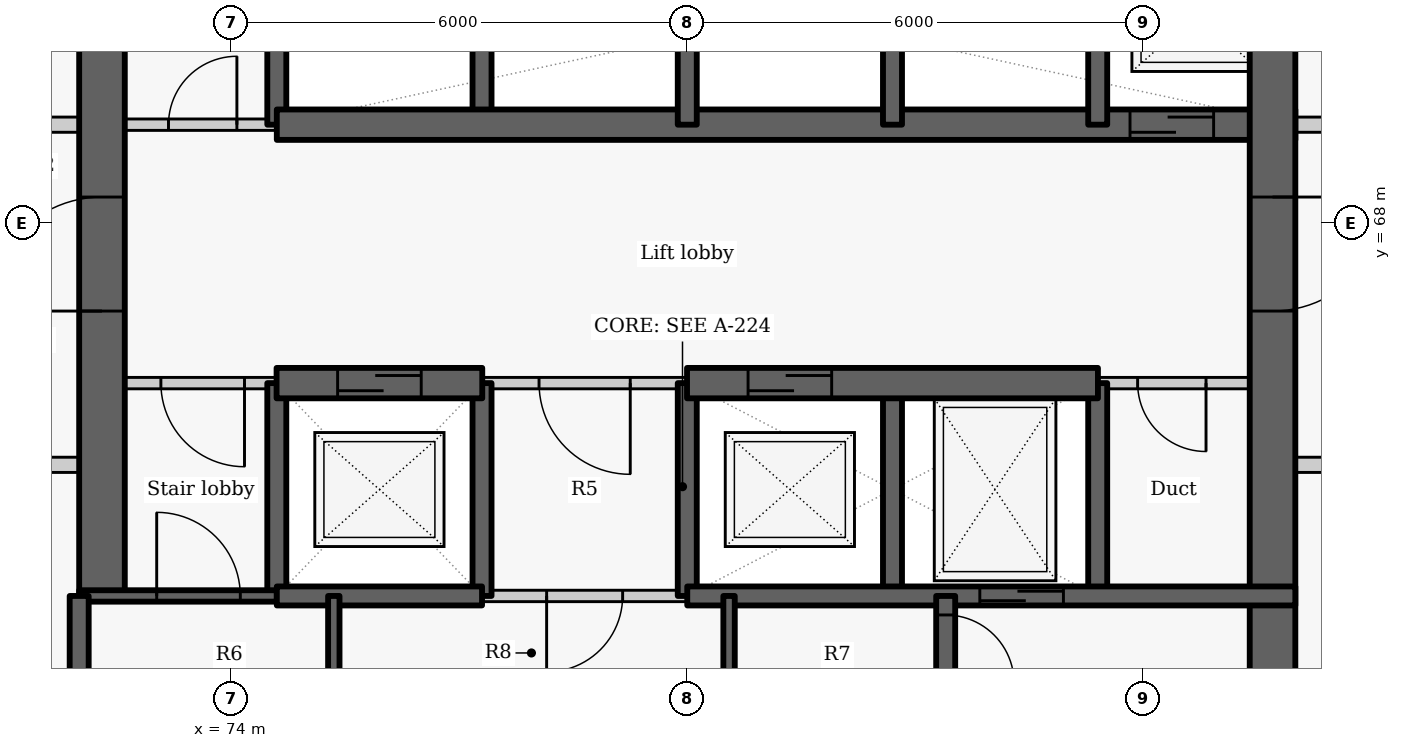
"""IFC4 building model, lengths in metres.
Left out: names, types, materials, properties, quantities, classifications, styles, units other than length and angle.
Written with IfcOpenShell. Run it as: python <this file> out.ifc"""

import sys

from ifc_helpers import new_model, si_unit, direction, frame, frame_2d, origin, place, context, subcontext, project, spatial, rectangle, extrude, element, fill, save


model = new_model("IFC4")
c1 = context("Model", 3, precision=1e-05, world=origin(), true_north=direction((0.0, 1.0)))
c2 = subcontext(c1, "Body", "Model", "MODEL_VIEW")
j1 = project(units=[si_unit("LENGTHUNIT", "METRE"), si_unit("PLANEANGLEUNIT", "RADIAN")], contexts=[c1])
p1 = place(None, origin())
s1 = spatial("IfcSite", under=j1, at=p1, CompositionType="ELEMENT")
p2 = place(p1, origin())
s2 = spatial("IfcBuilding", under=s1, at=p2, CompositionType="ELEMENT")
p3 = place(p2, frame((0.0, 0.0, 127.2)))
s3 = spatial("IfcBuildingStorey", under=s2, at=p3, CompositionType="ELEMENT", Elevation=127.2)
p4 = place(p3, frame((74.6, 63.1, -0.41), z_axis=(0.0, 0.0, 1.0), x_axis=(0.0, 1.0, 0.0)))
e1 = element("IfcWall", 1, at=p4, inside=s3, PredefinedType="SHEAR", context=c2, shape_type="SweptSolid", body=[
    extrude(rectangle(XDim=2.8, YDim=0.25, at=frame_2d((1.4, 0.0))), origin(), (0.0, 0.0, 1.0), 3.435),
])
p5 = place(p3, frame((74.6, 69.3, -0.41), z_axis=(0.0, 0.0, 1.0), x_axis=(0.0, 1.0, 0.0)))
e2 = element("IfcWall", 2, at=p5, inside=s3, PredefinedType="SHEAR", context=c2, shape_type="SweptSolid", body=[
    extrude(rectangle(XDim=2.9, YDim=0.25, at=frame_2d((1.45, 0.0))), origin(), (0.0, 0.0, 1.0), 3.435),
])
p6 = place(p3, frame((72.0, 69.3, 0.0), z_axis=(0.0, 0.0, 1.0), x_axis=(1.0, 0.0, 0.0)))
e3 = element("IfcWall", 3, at=p6, inside=s3, PredefinedType="PARTITIONING", context=c2, shape_type="SweptSolid", body=[
    extrude(rectangle(XDim=2.6, YDim=0.15, at=frame_2d((1.3, 0.0))), origin(), (0.0, 0.0, 1.0), 3.025),
])
p7 = place(p6, frame((1.175, 0.0, 0.0)))
e4 = element("IfcOpeningElement", 4, at=p7, cuts=e3, PredefinedType="OPENING", context=c2, shape_type="SweptSolid", body=[
    extrude(rectangle(XDim=0.9, YDim=2.1, at=frame_2d((0.45, 1.05))), frame((0.0, 0.085, 0.0), z_axis=(0.0, -1.0, 0.0), x_axis=(1.0, 0.0, 0.0)), (0.0, 0.0, 1.0), 0.17),
])
p8 = place(p3, frame((72.3, 63.1, -0.41), z_axis=(0.0, 0.0, 1.0), x_axis=(0.0, 1.0, 0.0)))
e5 = element("IfcWall", 5, at=p8, inside=s3, PredefinedType="SHEAR", context=c2, shape_type="SweptSolid", body=[
    extrude(rectangle(XDim=9.1, YDim=0.6, at=frame_2d((4.55, 0.0))), origin(), (0.0, 0.0, 1.0), 3.435),
])
p9 = place(p8, frame((3.748, 0.0, 0.41)))
e6 = element("IfcOpeningElement", 6, at=p9, cuts=e5, PredefinedType="OPENING", context=c2, shape_type="SweptSolid", body=[
    extrude(rectangle(XDim=1.5, YDim=2.1, at=frame_2d((0.75, 1.05))), frame((0.0, 0.31, 0.0), z_axis=(0.0, -1.0, 0.0), x_axis=(1.0, 0.0, 0.0)), (0.0, 0.0, 1.0), 0.62),
])
p10 = place(p3, frame((77.3, 63.1, -0.41), z_axis=(0.0, 0.0, 1.0), x_axis=(0.0, 1.0, 0.0)))
e7 = element("IfcWall", 7, at=p10, inside=s3, PredefinedType="SHEAR", context=c2, shape_type="SweptSolid", body=[
    extrude(rectangle(XDim=2.8, YDim=0.25, at=frame_2d((1.4, 0.0))), origin(), (0.0, 0.0, 1.0), 3.435),
])
p11 = place(p3, frame((77.3, 69.3, -0.41), z_axis=(0.0, 0.0, 1.0), x_axis=(0.0, 1.0, 0.0)))
e8 = element("IfcWall", 8, at=p11, inside=s3, PredefinedType="SHEAR", context=c2, shape_type="SweptSolid", body=[
    extrude(rectangle(XDim=2.9, YDim=0.25, at=frame_2d((1.45, 0.0))), origin(), (0.0, 0.0, 1.0), 3.435),
])
p12 = place(p3, frame((74.6, 69.3, -0.41), z_axis=(0.0, 0.0, 1.0), x_axis=(1.0, 0.0, 0.0)))
e9 = element("IfcWall", 9, at=p12, inside=s3, PredefinedType="SHEAR", context=c2, shape_type="SweptSolid", body=[
    extrude(rectangle(XDim=13.4, YDim=0.4, at=frame_2d((6.7, 0.0))), origin(), (0.0, 0.0, 1.0), 3.435),
])
p13 = place(p12, frame((11.225, 0.0, 0.41)))
e10 = element("IfcOpeningElement", 10, at=p13, cuts=e9, PredefinedType="OPENING", context=c2, shape_type="SweptSolid", body=[
    extrude(rectangle(XDim=1.1, YDim=2.1, at=frame_2d((0.55, 1.05))), frame((0.0, 0.21, 0.0), z_axis=(0.0, -1.0, 0.0), x_axis=(1.0, 0.0, 0.0)), (0.0, 0.0, 1.0), 0.42),
])
p14 = place(p3, frame((80.0, 63.1, -0.41), z_axis=(0.0, 0.0, 1.0), x_axis=(0.0, 1.0, 0.0)))
e11 = element("IfcWall", 11, at=p14, inside=s3, PredefinedType="SHEAR", context=c2, shape_type="SweptSolid", body=[
    extrude(rectangle(XDim=2.8, YDim=0.25, at=frame_2d((1.4, 0.0))), origin(), (0.0, 0.0, 1.0), 3.435),
])
p15 = place(p3, frame((80.0, 69.3, -0.41), z_axis=(0.0, 0.0, 1.0), x_axis=(0.0, 1.0, 0.0)))
e12 = element("IfcWall", 12, at=p15, inside=s3, PredefinedType="SHEAR", context=c2, shape_type="SweptSolid", body=[
    extrude(rectangle(XDim=2.9, YDim=0.25, at=frame_2d((1.45, 0.0))), origin(), (0.0, 0.0, 1.0), 3.435),
])
p16 = place(p3, frame((82.7, 63.1, -0.41), z_axis=(0.0, 0.0, 1.0), x_axis=(0.0, 1.0, 0.0)))
e13 = element("IfcWall", 13, at=p16, inside=s3, PredefinedType="SHEAR", context=c2, shape_type="SweptSolid", body=[
    extrude(rectangle(XDim=2.8, YDim=0.25, at=frame_2d((1.4, 0.0))), origin(), (0.0, 0.0, 1.0), 3.435),
])
p17 = place(p3, frame((82.7, 69.3, -0.41), z_axis=(0.0, 0.0, 1.0), x_axis=(0.0, 1.0, 0.0)))
e14 = element("IfcWall", 14, at=p17, inside=s3, PredefinedType="SHEAR", context=c2, shape_type="SweptSolid", body=[
    extrude(rectangle(XDim=2.9, YDim=0.25, at=frame_2d((1.45, 0.0))), origin(), (0.0, 0.0, 1.0), 3.435),
])
p18 = place(p3, frame((85.4, 63.1, -0.41), z_axis=(0.0, 0.0, 1.0), x_axis=(0.0, 1.0, 0.0)))
e15 = element("IfcWall", 15, at=p18, inside=s3, PredefinedType="SHEAR", context=c2, shape_type="SweptSolid", body=[
    extrude(rectangle(XDim=2.8, YDim=0.25, at=frame_2d((1.4, 0.0))), origin(), (0.0, 0.0, 1.0), 3.435),
])
p19 = place(p3, frame((85.4, 69.3, -0.41), z_axis=(0.0, 0.0, 1.0), x_axis=(0.0, 1.0, 0.0)))
e16 = element("IfcWall", 16, at=p19, inside=s3, PredefinedType="SHEAR", context=c2, shape_type="SweptSolid", body=[
    extrude(rectangle(XDim=2.9, YDim=0.25, at=frame_2d((1.45, 0.0))), origin(), (0.0, 0.0, 1.0), 3.435),
])
p20 = place(p3, frame((87.7, 72.2, -0.41), z_axis=(0.0, 0.0, 1.0), x_axis=(0.0, -1.0, 0.0)))
e17 = element("IfcWall", 17, at=p20, inside=s3, PredefinedType="SHEAR", context=c2, shape_type="SweptSolid", body=[
    extrude(rectangle(XDim=15.6, YDim=0.6, at=frame_2d((7.8, 0.0))), origin(), (0.0, 0.0, 1.0), 3.435),
])
p21 = place(p20, frame((3.852, 0.0, 0.41)))
e18 = element("IfcOpeningElement", 18, at=p21, cuts=e17, PredefinedType="OPENING", context=c2, shape_type="SweptSolid", body=[
    extrude(rectangle(XDim=1.5, YDim=2.1, at=frame_2d((0.75, 1.05))), frame((0.0, 0.31, 0.0), z_axis=(0.0, -1.0, 0.0), x_axis=(1.0, 0.0, 0.0)), (0.0, 0.0, 1.0), 0.62),
])
p22 = place(p3, frame((74.603, 65.9, 0.0), z_axis=(0.0, 0.0, 1.0), x_axis=(-1.0, 0.0, 0.0)))
e19 = element("IfcWall", 19, at=p22, inside=s3, PredefinedType="PARTITIONING", context=c2, shape_type="SweptSolid", body=[
    extrude(rectangle(XDim=2.603, YDim=0.15, at=frame_2d((1.302, 0.0))), origin(), (0.0, 0.0, 1.0), 3.025),
])
p23 = place(p22, frame((0.428, 0.0, 0.0)))
e20 = element("IfcOpeningElement", 20, at=p23, cuts=e19, PredefinedType="OPENING", context=c2, shape_type="SweptSolid", body=[
    extrude(rectangle(XDim=1.1, YDim=2.1, at=frame_2d((0.55, 1.05))), frame((0.0, 0.085, 0.0), z_axis=(0.0, -1.0, 0.0), x_axis=(1.0, 0.0, 0.0)), (0.0, 0.0, 1.0), 0.17),
])
p24 = place(p3, frame((80.003, 65.9, 0.0), z_axis=(0.0, 0.0, 1.0), x_axis=(-1.0, 0.0, 0.0)))
e21 = element("IfcWall", 21, at=p24, inside=s3, PredefinedType="PARTITIONING", context=c2, shape_type="SweptSolid", body=[
    extrude(rectangle(XDim=2.706, YDim=0.15, at=frame_2d((1.353, 0.0))), origin(), (0.0, 0.0, 1.0), 3.025),
])
p25 = place(p24, frame((0.753, 0.0, 0.0)))
e22 = element("IfcOpeningElement", 22, at=p25, cuts=e21, PredefinedType="OPENING", context=c2, shape_type="SweptSolid", body=[
    extrude(rectangle(XDim=1.2, YDim=2.1, at=frame_2d((0.6, 1.05))), frame((0.0, 0.085, 0.0), z_axis=(0.0, -1.0, 0.0), x_axis=(1.0, 0.0, 0.0)), (0.0, 0.0, 1.0), 0.17),
])
p26 = place(p3, frame((88.0, 65.9, 0.0), z_axis=(0.0, 0.0, 1.0), x_axis=(-1.0, 0.0, 0.0)))
e23 = element("IfcWall", 23, at=p26, inside=s3, PredefinedType="PARTITIONING", context=c2, shape_type="SweptSolid", body=[
    extrude(rectangle(XDim=2.603, YDim=0.15, at=frame_2d((1.302, 0.0))), origin(), (0.0, 0.0, 1.0), 3.025),
])
p27 = place(p26, frame((1.175, 0.0, 0.0)))
e24 = element("IfcOpeningElement", 24, at=p27, cuts=e23, PredefinedType="OPENING", context=c2, shape_type="SweptSolid", body=[
    extrude(rectangle(XDim=0.9, YDim=2.1, at=frame_2d((0.45, 1.05))), frame((0.0, 0.085, 0.0), z_axis=(0.0, -1.0, 0.0), x_axis=(1.0, 0.0, 0.0)), (0.0, 0.0, 1.0), 0.17),
])
p28 = place(p3, frame((74.597, 65.9, -0.41), z_axis=(0.0, 0.0, 1.0), x_axis=(1.0, 0.0, 0.0)))
e25 = element("IfcWall", 25, at=p28, inside=s3, PredefinedType="SHEAR", context=c2, shape_type="SweptSolid", body=[
    extrude(rectangle(XDim=2.706, YDim=0.4, at=frame_2d((1.353, 0.0))), origin(), (0.0, 0.0, 1.0), 3.435),
])
p29 = place(p28, frame((0.803, 0.0, 0.41)))
e26 = element("IfcOpeningElement", 26, at=p29, cuts=e25, PredefinedType="OPENING", context=c2, shape_type="SweptSolid", body=[
    extrude(rectangle(XDim=1.1, YDim=2.1, at=frame_2d((0.55, 1.05))), frame((0.0, 0.21, 0.0), z_axis=(0.0, -1.0, 0.0), x_axis=(1.0, 0.0, 0.0)), (0.0, 0.0, 1.0), 0.42),
])
p30 = place(p3, frame((79.997, 65.9, -0.41), z_axis=(0.0, 0.0, 1.0), x_axis=(1.0, 0.0, 0.0)))
e27 = element("IfcWall", 27, at=p30, inside=s3, PredefinedType="SHEAR", context=c2, shape_type="SweptSolid", body=[
    extrude(rectangle(XDim=5.406, YDim=0.4, at=frame_2d((2.703, 0.0))), origin(), (0.0, 0.0, 1.0), 3.435),
])
p31 = place(p30, frame((0.803, 0.0, 0.41)))
e28 = element("IfcOpeningElement", 28, at=p31, cuts=e27, PredefinedType="OPENING", context=c2, shape_type="SweptSolid", body=[
    extrude(rectangle(XDim=1.1, YDim=2.1, at=frame_2d((0.55, 1.05))), frame((0.0, 0.21, 0.0), z_axis=(0.0, -1.0, 0.0), x_axis=(1.0, 0.0, 0.0)), (0.0, 0.0, 1.0), 0.42),
])
p32 = place(p3, frame((72.0, 63.1, -0.41), z_axis=(0.0, 0.0, 1.0), x_axis=(1.0, 0.0, 0.0)))
e29 = element("IfcWall", 29, at=p32, inside=s3, PredefinedType="SHEAR", context=c2, shape_type="SweptSolid", body=[
    extrude(rectangle(XDim=2.6, YDim=0.15, at=frame_2d((1.3, 0.0))), origin(), (0.0, 0.0, 1.0), 3.435),
])
p33 = place(p32, frame((1.02, 0.0, 0.41)))
e30 = element("IfcOpeningElement", 30, at=p33, cuts=e29, PredefinedType="OPENING", context=c2, shape_type="SweptSolid", body=[
    extrude(rectangle(XDim=1.1, YDim=2.1, at=frame_2d((0.55, 1.05))), frame((0.0, 0.085, 0.0), z_axis=(0.0, -1.0, 0.0), x_axis=(1.0, 0.0, 0.0)), (0.0, 0.0, 1.0), 0.17),
])
p34 = place(p3, frame((74.6, 63.1, -0.41), z_axis=(0.0, 0.0, 1.0), x_axis=(1.0, 0.0, 0.0)))
e31 = element("IfcWall", 31, at=p34, inside=s3, PredefinedType="SHEAR", context=c2, shape_type="SweptSolid", body=[
    extrude(rectangle(XDim=2.7, YDim=0.25, at=frame_2d((1.35, 0.0))), origin(), (0.0, 0.0, 1.0), 3.435),
])
p35 = place(p3, frame((80.0, 63.1, -0.41), z_axis=(0.0, 0.0, 1.0), x_axis=(1.0, 0.0, 0.0)))
e32 = element("IfcWall", 32, at=p35, inside=s3, PredefinedType="SHEAR", context=c2, shape_type="SweptSolid", body=[
    extrude(rectangle(XDim=8.0, YDim=0.25, at=frame_2d((4.0, 0.0))), origin(), (0.0, 0.0, 1.0), 3.435),
])
p36 = place(p35, frame((3.849, 0.0, 0.41)))
e33 = element("IfcOpeningElement", 33, at=p36, cuts=e32, PredefinedType="OPENING", context=c2, shape_type="SweptSolid", body=[
    extrude(rectangle(XDim=1.1, YDim=2.1, at=frame_2d((0.55, 1.05))), frame((0.0, 0.135, 0.0), z_axis=(0.0, -1.0, 0.0), x_axis=(1.0, 0.0, 0.0)), (0.0, 0.0, 1.0), 0.27),
])
p37 = place(p3, frame((80.0, 63.1, 0.0), z_axis=(0.0, 0.0, 1.0), x_axis=(-1.0, 0.0, 0.0)))
e34 = element("IfcWall", 34, at=p37, inside=s3, PredefinedType="PARTITIONING", context=c2, shape_type="SweptSolid", body=[
    extrude(rectangle(XDim=2.7, YDim=0.15, at=frame_2d((1.35, 0.0))), origin(), (0.0, 0.0, 1.0), 3.025),
])
p38 = place(p37, frame((0.85, 0.0, 0.0)))
e35 = element("IfcOpeningElement", 35, at=p38, cuts=e34, PredefinedType="OPENING", context=c2, shape_type="SweptSolid", body=[
    extrude(rectangle(XDim=1.0, YDim=2.1, at=frame_2d((0.5, 1.05))), frame((0.0, 0.085, 0.0), z_axis=(0.0, -1.0, 0.0), x_axis=(1.0, 0.0, 0.0)), (0.0, 0.0, 1.0), 0.17),
])
p39 = place(p3, frame((75.35, 61.597, -0.41), z_axis=(0.0, 0.0, 1.0), x_axis=(0.0, 1.0, 0.0)))
e36 = element("IfcWall", 36, at=p39, inside=s3, PredefinedType="SHEAR", context=c2, shape_type="SweptSolid", body=[
    extrude(rectangle(XDim=1.503, YDim=0.15, at=frame_2d((0.751, 0.0))), origin(), (0.0, 0.0, 1.0), 3.435),
])
p40 = place(p3, frame((72.0, 56.6, -0.41), z_axis=(0.0, 0.0, 1.0), x_axis=(0.0, 1.0, 0.0)))
e37 = element("IfcWall", 37, at=p40, inside=s3, PredefinedType="SHEAR", context=c2, shape_type="SweptSolid", body=[
    extrude(rectangle(XDim=6.5, YDim=0.25, at=frame_2d((3.25, 0.0))), origin(), (0.0, 0.0, 1.0), 3.435),
])
p41 = place(p3, frame((83.4, 63.1, -0.41), z_axis=(0.0, 0.0, 1.0), x_axis=(0.0, -1.0, 0.0)))
e38 = element("IfcWall", 38, at=p41, inside=s3, PredefinedType="SHEAR", context=c2, shape_type="SweptSolid", body=[
    extrude(rectangle(XDim=6.5, YDim=0.25, at=frame_2d((3.25, 0.0))), origin(), (0.0, 0.0, 1.0), 3.435),
])
p42 = place(p41, frame((0.25, 0.0, 0.41)))
e39 = element("IfcOpeningElement", 39, at=p42, cuts=e38, PredefinedType="OPENING", context=c2, shape_type="SweptSolid", body=[
    extrude(rectangle(XDim=0.9, YDim=2.1, at=frame_2d((0.45, 1.05))), frame((0.0, 0.135, 0.0), z_axis=(0.0, -1.0, 0.0), x_axis=(1.0, 0.0, 0.0)), (0.0, 0.0, 1.0), 0.27),
])
p43 = place(p3, frame((80.55, 61.597, -0.41), z_axis=(0.0, 0.0, 1.0), x_axis=(0.0, 1.0, 0.0)))
e40 = element("IfcWall", 40, at=p43, inside=s3, PredefinedType="SHEAR", context=c2, shape_type="SweptSolid", body=[
    extrude(rectangle(XDim=1.503, YDim=0.15, at=frame_2d((0.751, 0.0))), origin(), (0.0, 0.0, 1.0), 3.435),
])
p44 = place(p3, frame((70.577, 64.825, 0.0), z_axis=(0.0, 0.0, 1.0), x_axis=(1.0, 0.0, 0.0)))
e41 = element("IfcWall", 41, at=p44, inside=s3, PredefinedType="PARTITIONING", context=c2, shape_type="SweptSolid", body=[
    extrude(rectangle(XDim=1.423, YDim=0.2, at=frame_2d((0.711, 0.0))), origin(), (0.0, 0.0, 1.0), 3.025),
])
p45 = place(p3, frame((88.0, 64.825, 0.0), z_axis=(0.0, 0.0, 1.0), x_axis=(1.0, 0.0, 0.0)))
e42 = element("IfcWall", 42, at=p45, inside=s3, PredefinedType="PARTITIONING", context=c2, shape_type="SweptSolid", body=[
    extrude(rectangle(XDim=2.463, YDim=0.2, at=frame_2d((1.231, 0.0))), origin(), (0.0, 0.0, 1.0), 2.505),
])
for number, where, z_axis, x_axis in (
    (43, (70.45, 69.3, 0.0), (0.0, 0.0, 1.0), (1.0, 0.0, 0.0)),
    (44, (88.0, 69.3, 0.0), (0.0, 0.0, 1.0), (1.0, 0.0, 0.0)),
):
    element("IfcWall", number, at=place(p3, frame(where, z_axis=z_axis, x_axis=x_axis)), inside=s3, PredefinedType="PARTITIONING", context=c2, shape_type="SweptSolid", body=[
        extrude(rectangle(XDim=1.55, YDim=0.2, at=frame_2d((0.775, 0.0))), origin(), (0.0, 0.0, 1.0), 3.025),
    ])
p46 = place(p7, origin())
e45 = element("IfcDoor", 45, at=p46, inside=s3, OperationType="SINGLE_SWING_RIGHT", PredefinedType="DOOR", context=c2, shape_type="SweptSolid", body=[
    extrude(rectangle(XDim=0.9, YDim=2.1, at=frame_2d((0.45, 1.05))), frame((0.0, 0.025, 0.0), z_axis=(0.0, -1.0, 0.0), x_axis=(1.0, 0.0, 0.0)), (0.0, 0.0, 1.0), 0.05),
])
fill(e4, e45)
p47 = place(p13, origin())
e46 = element("IfcDoor", 46, at=p47, inside=s3, OperationType="SLIDING_TO_LEFT", PredefinedType="DOOR", context=c2, shape_type="SweptSolid", body=[
    extrude(rectangle(XDim=1.1, YDim=2.1, at=frame_2d((0.55, 1.05))), frame((0.0, 0.025, 0.0), z_axis=(0.0, -1.0, 0.0), x_axis=(1.0, 0.0, 0.0)), (0.0, 0.0, 1.0), 0.05),
])
fill(e10, e46)
p48 = place(p23, origin())
e47 = element("IfcDoor", 47, at=p48, inside=s3, OperationType="SINGLE_SWING_LEFT", PredefinedType="DOOR", context=c2, shape_type="SweptSolid", body=[
    extrude(rectangle(XDim=1.1, YDim=2.1, at=frame_2d((0.55, 1.05))), frame((0.0, 0.025, 0.0), z_axis=(0.0, -1.0, 0.0), x_axis=(1.0, 0.0, 0.0)), (0.0, 0.0, 1.0), 0.05),
])
fill(e20, e47)
p49 = place(p29, origin())
e48 = element("IfcDoor", 48, at=p49, inside=s3, OperationType="SLIDING_TO_LEFT", PredefinedType="DOOR", context=c2, shape_type="SweptSolid", body=[
    extrude(rectangle(XDim=1.1, YDim=2.1, at=frame_2d((0.55, 1.05))), frame((0.0, 0.025, 0.0), z_axis=(0.0, -1.0, 0.0), x_axis=(1.0, 0.0, 0.0)), (0.0, 0.0, 1.0), 0.05),
])
fill(e26, e48)
p50 = place(p25, origin())
e49 = element("IfcDoor", 49, at=p50, inside=s3, OperationType="DOUBLE_DOOR_SINGLE_SWING", PredefinedType="DOOR", context=c2, shape_type="SweptSolid", body=[
    extrude(rectangle(XDim=1.2, YDim=2.1, at=frame_2d((0.6, 1.05))), frame((0.0, 0.025, 0.0), z_axis=(0.0, -1.0, 0.0), x_axis=(1.0, 0.0, 0.0)), (0.0, 0.0, 1.0), 0.05),
])
fill(e22, e49)
p51 = place(p31, origin())
e50 = element("IfcDoor", 50, at=p51, inside=s3, OperationType="SLIDING_TO_LEFT", PredefinedType="DOOR", context=c2, shape_type="SweptSolid", body=[
    extrude(rectangle(XDim=1.1, YDim=2.1, at=frame_2d((0.55, 1.05))), frame((0.0, 0.025, 0.0), z_axis=(0.0, -1.0, 0.0), x_axis=(1.0, 0.0, 0.0)), (0.0, 0.0, 1.0), 0.05),
])
fill(e28, e50)
p52 = place(p36, origin())
e51 = element("IfcDoor", 51, at=p52, inside=s3, OperationType="SLIDING_TO_LEFT", PredefinedType="DOOR", context=c2, shape_type="SweptSolid", body=[
    extrude(rectangle(XDim=1.1, YDim=2.1, at=frame_2d((0.55, 1.05))), frame((0.0, 0.025, 0.0), z_axis=(0.0, -1.0, 0.0), x_axis=(1.0, 0.0, 0.0)), (0.0, 0.0, 1.0), 0.05),
])
fill(e33, e51)
p53 = place(p27, origin())
e52 = element("IfcDoor", 52, at=p53, inside=s3, OperationType="SINGLE_SWING_LEFT", PredefinedType="DOOR", context=c2, shape_type="SweptSolid", body=[
    extrude(rectangle(XDim=0.9, YDim=2.1, at=frame_2d((0.45, 1.05))), frame((0.0, 0.025, 0.0), z_axis=(0.0, -1.0, 0.0), x_axis=(1.0, 0.0, 0.0)), (0.0, 0.0, 1.0), 0.05),
])
fill(e24, e52)
p54 = place(p38, origin())
e53 = element("IfcDoor", 53, at=p54, inside=s3, OperationType="SINGLE_SWING_RIGHT", PredefinedType="DOOR", context=c2, shape_type="SweptSolid", body=[
    extrude(rectangle(XDim=1.0, YDim=2.1, at=frame_2d((0.5, 1.05))), frame((0.0, 0.025, 0.0), z_axis=(0.0, -1.0, 0.0), x_axis=(1.0, 0.0, 0.0)), (0.0, 0.0, 1.0), 0.05),
])
fill(e35, e53)
p55 = place(p33, origin())
e54 = element("IfcDoor", 54, at=p55, inside=s3, OperationType="SINGLE_SWING_LEFT", PredefinedType="DOOR", context=c2, shape_type="SweptSolid", body=[
    extrude(rectangle(XDim=1.1, YDim=2.1, at=frame_2d((0.55, 1.05))), frame((0.0, 0.025, 0.0), z_axis=(0.0, -1.0, 0.0), x_axis=(1.0, 0.0, 0.0)), (0.0, 0.0, 1.0), 0.05),
])
fill(e30, e54)
p56 = place(p42, origin())
e55 = element("IfcDoor", 55, at=p56, inside=s3, OperationType="SINGLE_SWING_RIGHT", PredefinedType="DOOR", context=c2, shape_type="SweptSolid", body=[
    extrude(rectangle(XDim=0.9, YDim=2.1, at=frame_2d((0.45, 1.05))), frame((0.0, 0.025, 0.0), z_axis=(0.0, -1.0, 0.0), x_axis=(1.0, 0.0, 0.0)), (0.0, 0.0, 1.0), 0.05),
])
fill(e39, e55)
p57 = place(p21, origin())
e56 = element("IfcDoor", 56, at=p57, inside=s3, OperationType="DOUBLE_DOOR_SINGLE_SWING", PredefinedType="DOOR", context=c2, shape_type="SweptSolid", body=[
    extrude(rectangle(XDim=1.5, YDim=2.1, at=frame_2d((0.75, 1.05))), frame((0.0, 0.025, 0.0), z_axis=(0.0, -1.0, 0.0), x_axis=(1.0, 0.0, 0.0)), (0.0, 0.0, 1.0), 0.05),
])
fill(e18, e56)
p58 = place(p9, origin())
e57 = element("IfcDoor", 57, at=p58, inside=s3, OperationType="DOUBLE_DOOR_SINGLE_SWING", PredefinedType="DOOR", context=c2, shape_type="SweptSolid", body=[
    extrude(rectangle(XDim=1.5, YDim=2.1, at=frame_2d((0.75, 1.05))), frame((0.0, 0.025, 0.0), z_axis=(0.0, -1.0, 0.0), x_axis=(1.0, 0.0, 0.0)), (0.0, 0.0, 1.0), 0.05),
])
fill(e6, e57)
save(model, sys.argv[1])
